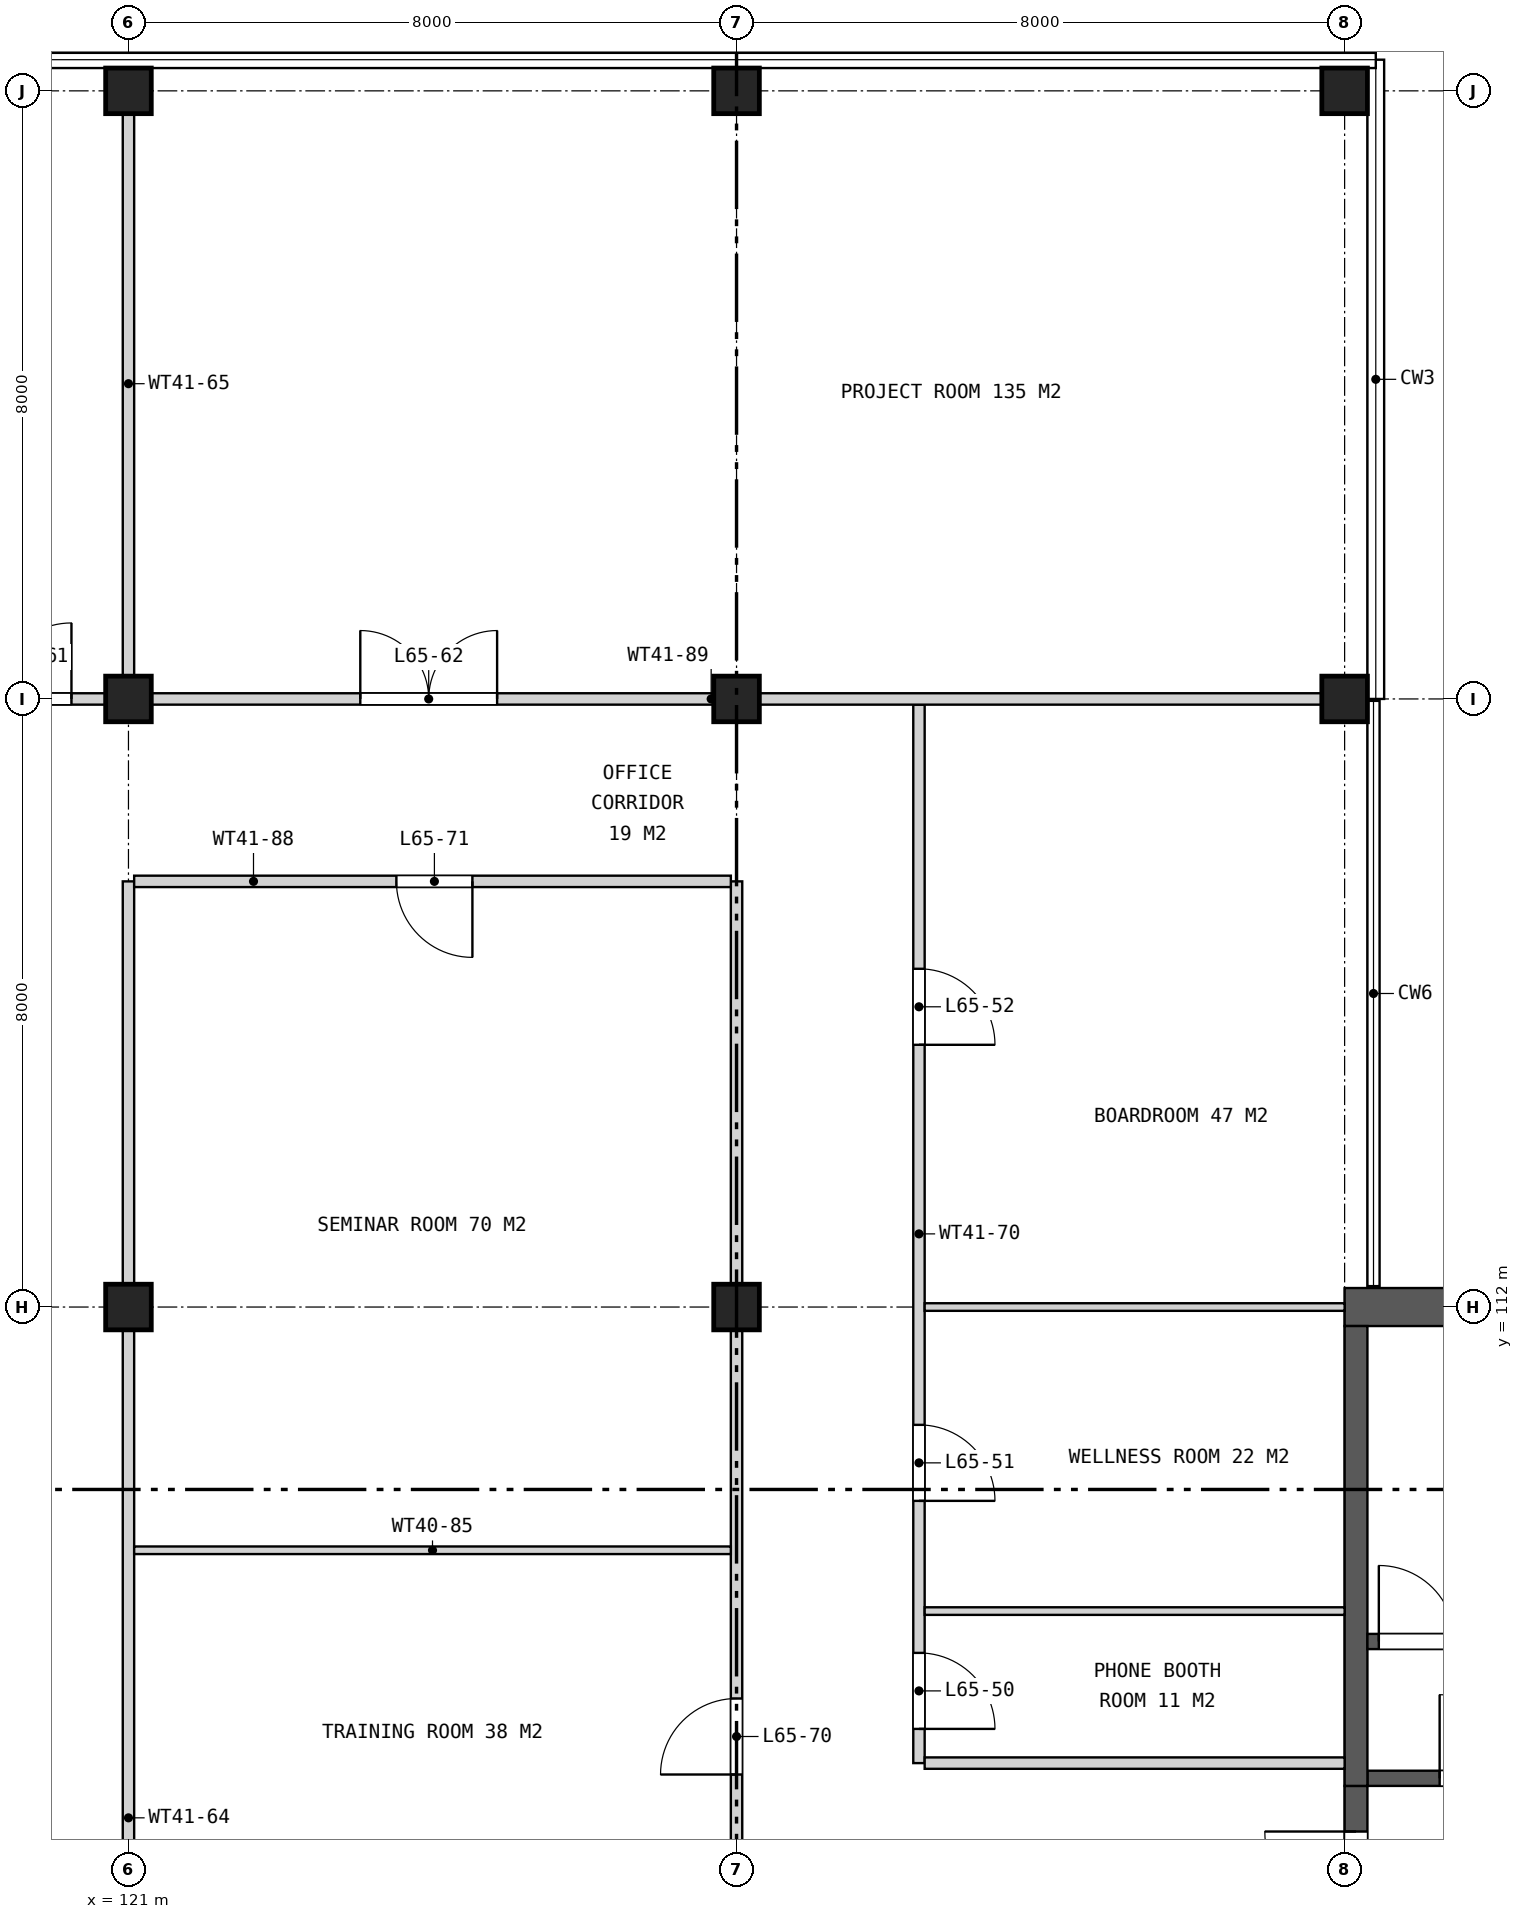
"""IFC4 building model, lengths in metres.
Left out: names, types, materials, properties, quantities, classifications, styles, units other than length and angle.
Written with IfcOpenShell. Run it as: python <this file> out.ifc"""

import sys

from ifc_helpers import new_model, si_unit, direction, frame, frame_2d, origin, origin_2d, place, context, subcontext, project, spatial, rectangle, extrude, element, fill, save


model = new_model("IFC4")
c1 = context("Model", 3, precision=1e-05, world=origin(), true_north=direction((0.0, 1.0)))
c2 = subcontext(c1, "Body", "Model", "MODEL_VIEW")
j1 = project(units=[si_unit("LENGTHUNIT", "METRE"), si_unit("PLANEANGLEUNIT", "RADIAN")], contexts=[c1])
p1 = place(None, origin())
s1 = spatial("IfcSite", under=j1, at=p1, CompositionType="ELEMENT")
p2 = place(p1, origin())
s2 = spatial("IfcBuilding", under=s1, at=p2, CompositionType="ELEMENT")
p3 = place(p2, frame((0.0, 0.0, 299.7)))
s3 = spatial("IfcBuildingStorey", under=s2, at=p3, CompositionType="ELEMENT", Elevation=299.7)
for number, where, z_axis, x_axis in (
    (1, (121.0, 112.0, 0.0), (0.0, 0.0, 1.0), (1.0, 0.0, 0.0)),
    (2, (121.0, 120.0, 0.0), (0.0, 0.0, 1.0), (1.0, 0.0, 0.0)),
    (3, (121.0, 128.0, 0.0), (0.0, 0.0, 1.0), (1.0, 0.0, 0.0)),
    (4, (129.0, 112.0, 0.0), (0.0, 0.0, 1.0), (1.0, 0.0, 0.0)),
    (5, (129.0, 120.0, 0.0), (0.0, 0.0, 1.0), (1.0, 0.0, 0.0)),
    (6, (129.0, 128.0, 0.0), (0.0, 0.0, 1.0), (1.0, 0.0, 0.0)),
    (7, (137.0, 120.0, 0.0), (0.0, 0.0, 1.0), (1.0, 0.0, 0.0)),
    (8, (137.0, 128.0, 0.0), (0.0, 0.0, 1.0), (1.0, 0.0, 0.0)),
):
    element("IfcColumn", number, at=place(p3, frame(where, z_axis=z_axis, x_axis=x_axis)), inside=s3, PredefinedType="COLUMN", context=c2, shape_type="SweptSolid", body=[
        extrude(rectangle(XDim=0.6, YDim=0.6, at=origin_2d()), origin(), (0.0, 0.0, 1.0), 4.2),
    ])
p4 = place(p3, frame((137.0, 112.0, 0.0), z_axis=(0.0, 0.0, 1.0), x_axis=(1.0, 0.0, 0.0)))
e9 = element("IfcWall", 9, at=p4, inside=s3, PredefinedType="SHEAR", context=c2, shape_type="SweptSolid", body=[
    extrude(rectangle(XDim=7.1, YDim=0.5, at=frame_2d((3.55, 0.0))), origin(), (0.0, 0.0, 1.0), 4.2),
])
p5 = place(p3, frame((137.15, 94.3, 0.0), z_axis=(0.0, 0.0, 1.0), x_axis=(0.0, 1.0, 0.0)))
e10 = element("IfcWall", 10, at=p5, inside=s3, PredefinedType="SHEAR", context=c2, shape_type="SweptSolid", body=[
    extrude(rectangle(XDim=11.4, YDim=0.3, at=frame_2d((5.7, 0.0))), origin(), (0.0, 0.0, 1.0), 4.2),
])
p6 = place(p5, frame((0.6, 0.0, 0.0)))
e11 = element("IfcOpeningElement", 11, at=p6, cuts=e10, PredefinedType="OPENING", context=c2, shape_type="SweptSolid", body=[
    extrude(rectangle(XDim=2.4, YDim=2.4, at=frame_2d((1.2, 1.2))), frame((0.0, 0.16, 0.0), z_axis=(0.0, -1.0, 0.0), x_axis=(1.0, 0.0, 0.0)), (0.0, 0.0, 1.0), 0.32),
])
p7 = place(p5, frame((4.5, 0.0, 0.0)))
e12 = element("IfcOpeningElement", 12, at=p7, cuts=e10, PredefinedType="OPENING", context=c2, shape_type="SweptSolid", body=[
    extrude(rectangle(XDim=2.4, YDim=2.4, at=frame_2d((1.2, 1.2))), frame((0.0, 0.16, 0.0), z_axis=(0.0, -1.0, 0.0), x_axis=(1.0, 0.0, 0.0)), (0.0, 0.0, 1.0), 0.32),
])
p8 = place(p5, frame((8.4, 0.0, 0.0)))
e13 = element("IfcOpeningElement", 13, at=p8, cuts=e10, PredefinedType="OPENING", context=c2, shape_type="SweptSolid", body=[
    extrude(rectangle(XDim=2.4, YDim=2.4, at=frame_2d((1.2, 1.2))), frame((0.0, 0.16, 0.0), z_axis=(0.0, -1.0, 0.0), x_axis=(1.0, 0.0, 0.0)), (0.0, 0.0, 1.0), 0.32),
])
p9 = place(p3, frame((137.3, 105.8, 0.0), z_axis=(0.0, 0.0, 1.0), x_axis=(1.0, 0.0, 0.0)))
e14 = element("IfcWall", 14, at=p9, inside=s3, PredefinedType="SHEAR", context=c2, shape_type="SweptSolid", body=[
    extrude(rectangle(XDim=15.45, YDim=0.2, at=frame_2d((7.725, 0.0))), origin(), (0.0, 0.0, 1.0), 4.2),
])
p10 = place(p9, frame((0.95, 0.0, 0.0)))
e15 = element("IfcOpeningElement", 15, at=p10, cuts=e14, PredefinedType="OPENING", context=c2, shape_type="SweptSolid", body=[
    extrude(rectangle(XDim=1.1, YDim=2.1, at=frame_2d((0.55, 1.05))), frame((0.0, 0.11, 0.0), z_axis=(0.0, -1.0, 0.0), x_axis=(1.0, 0.0, 0.0)), (0.0, 0.0, 1.0), 0.22),
])
p11 = place(p3, frame((137.15, 105.7, 0.0), z_axis=(0.0, 0.0, 1.0), x_axis=(0.0, 1.0, 0.0)))
e16 = element("IfcWall", 16, at=p11, inside=s3, PredefinedType="SHEAR", context=c2, shape_type="SweptSolid", body=[
    extrude(rectangle(XDim=6.05, YDim=0.3, at=frame_2d((3.025, 0.0))), origin(), (0.0, 0.0, 1.0), 4.2),
])
p12 = place(p3, frame((137.3, 107.6, 0.0), z_axis=(0.0, 0.0, 1.0), x_axis=(1.0, 0.0, 0.0)))
e17 = element("IfcWall", 17, at=p12, inside=s3, PredefinedType="SHEAR", context=c2, shape_type="SweptSolid", body=[
    extrude(rectangle(XDim=6.8, YDim=0.2, at=frame_2d((3.4, 0.0))), origin(), (0.0, 0.0, 1.0), 4.2),
])
p13 = place(p12, frame((0.15, 0.0, 0.0)))
e18 = element("IfcOpeningElement", 18, at=p13, cuts=e17, PredefinedType="OPENING", context=c2, shape_type="SweptSolid", body=[
    extrude(rectangle(XDim=1.0, YDim=2.1, at=frame_2d((0.5, 1.05))), frame((0.0, 0.11, 0.0), z_axis=(0.0, -1.0, 0.0), x_axis=(1.0, 0.0, 0.0)), (0.0, 0.0, 1.0), 0.22),
])
p14 = place(p3, frame((121.0, 82.4, 0.0), z_axis=(0.0, 0.0, 1.0), x_axis=(0.0, 1.0, 0.0)))
e19 = element("IfcWall", 19, at=p14, inside=s3, PredefinedType="PARTITIONING", context=c2, shape_type="SweptSolid", body=[
    extrude(rectangle(XDim=35.2, YDim=0.15, at=frame_2d((17.6, 0.0))), origin(), (0.0, 0.0, 1.0), 3.255),
])
p15 = place(p14, frame((6.15, 0.0, 0.0)))
e20 = element("IfcOpeningElement", 20, at=p15, cuts=e19, PredefinedType="OPENING", context=c2, shape_type="SweptSolid", body=[
    extrude(rectangle(XDim=1.0, YDim=2.1, at=frame_2d((0.5, 1.05))), frame((0.0, 0.085, 0.0), z_axis=(0.0, -1.0, 0.0), x_axis=(1.0, 0.0, 0.0)), (0.0, 0.0, 1.0), 0.17),
])
p16 = place(p14, frame((10.75, 0.0, 0.0)))
e21 = element("IfcOpeningElement", 21, at=p16, cuts=e19, PredefinedType="OPENING", context=c2, shape_type="SweptSolid", body=[
    extrude(rectangle(XDim=1.0, YDim=2.1, at=frame_2d((0.5, 1.05))), frame((0.0, 0.085, 0.0), z_axis=(0.0, -1.0, 0.0), x_axis=(1.0, 0.0, 0.0)), (0.0, 0.0, 1.0), 0.17),
])
p17 = place(p14, frame((17.45, 0.0, 0.0)))
e22 = element("IfcOpeningElement", 22, at=p17, cuts=e19, PredefinedType="OPENING", context=c2, shape_type="SweptSolid", body=[
    extrude(rectangle(XDim=1.0, YDim=2.1, at=frame_2d((0.5, 1.05))), frame((0.0, 0.085, 0.0), z_axis=(0.0, -1.0, 0.0), x_axis=(1.0, 0.0, 0.0)), (0.0, 0.0, 1.0), 0.17),
])
p18 = place(p3, frame((121.0, 120.075, 0.0), z_axis=(0.0, 0.0, 1.0), x_axis=(0.0, 1.0, 0.0)))
e23 = element("IfcWall", 23, at=p18, inside=s3, PredefinedType="PARTITIONING", context=c2, shape_type="SweptSolid", body=[
    extrude(rectangle(XDim=8.145, YDim=0.15, at=frame_2d((4.073, 0.0))), origin(), (0.0, 0.0, 1.0), 3.255),
])
p19 = place(p3, frame((129.0, 82.4, 0.0), z_axis=(0.0, 0.0, 1.0), x_axis=(0.0, 1.0, 0.0)))
e24 = element("IfcWall", 24, at=p19, inside=s3, PredefinedType="PARTITIONING", context=c2, shape_type="SweptSolid", body=[
    extrude(rectangle(XDim=35.2, YDim=0.15, at=frame_2d((17.6, 0.0))), origin(), (0.0, 0.0, 1.0), 3.255),
])
p20 = place(p19, frame((10.75, 0.0, 0.0)))
e25 = element("IfcOpeningElement", 25, at=p20, cuts=e24, PredefinedType="OPENING", context=c2, shape_type="SweptSolid", body=[
    extrude(rectangle(XDim=1.0, YDim=2.1, at=frame_2d((0.5, 1.05))), frame((0.0, 0.085, 0.0), z_axis=(0.0, -1.0, 0.0), x_axis=(1.0, 0.0, 0.0)), (0.0, 0.0, 1.0), 0.17),
])
p21 = place(p19, frame((17.45, 0.0, 0.0)))
e26 = element("IfcOpeningElement", 26, at=p21, cuts=e24, PredefinedType="OPENING", context=c2, shape_type="SweptSolid", body=[
    extrude(rectangle(XDim=1.0, YDim=2.1, at=frame_2d((0.5, 1.05))), frame((0.0, 0.085, 0.0), z_axis=(0.0, -1.0, 0.0), x_axis=(1.0, 0.0, 0.0)), (0.0, 0.0, 1.0), 0.17),
])
p22 = place(p19, frame((23.45, 0.0, 0.0)))
e27 = element("IfcOpeningElement", 27, at=p22, cuts=e24, PredefinedType="OPENING", context=c2, shape_type="SweptSolid", body=[
    extrude(rectangle(XDim=1.0, YDim=2.1, at=frame_2d((0.5, 1.05))), frame((0.0, 0.085, 0.0), z_axis=(0.0, -1.0, 0.0), x_axis=(1.0, 0.0, 0.0)), (0.0, 0.0, 1.0), 0.17),
])
p23 = place(p3, frame((131.4, 106.0, 0.0), z_axis=(0.0, 0.0, 1.0), x_axis=(0.0, 1.0, 0.0)))
e28 = element("IfcWall", 28, at=p23, inside=s3, PredefinedType="PARTITIONING", context=c2, shape_type="SweptSolid", body=[
    extrude(rectangle(XDim=13.925, YDim=0.15, at=frame_2d((6.962, 0.0))), origin(), (0.0, 0.0, 1.0), 3.255),
])
p24 = place(p23, frame((0.45, 0.0, 0.0)))
e29 = element("IfcOpeningElement", 29, at=p24, cuts=e28, PredefinedType="OPENING", context=c2, shape_type="SweptSolid", body=[
    extrude(rectangle(XDim=1.0, YDim=2.1, at=frame_2d((0.5, 1.05))), frame((0.0, 0.085, 0.0), z_axis=(0.0, -1.0, 0.0), x_axis=(1.0, 0.0, 0.0)), (0.0, 0.0, 1.0), 0.17),
])
p25 = place(p23, frame((3.45, 0.0, 0.0)))
e30 = element("IfcOpeningElement", 30, at=p25, cuts=e28, PredefinedType="OPENING", context=c2, shape_type="SweptSolid", body=[
    extrude(rectangle(XDim=1.0, YDim=2.1, at=frame_2d((0.5, 1.05))), frame((0.0, 0.085, 0.0), z_axis=(0.0, -1.0, 0.0), x_axis=(1.0, 0.0, 0.0)), (0.0, 0.0, 1.0), 0.17),
])
p26 = place(p23, frame((9.45, 0.0, 0.0)))
e31 = element("IfcOpeningElement", 31, at=p26, cuts=e28, PredefinedType="OPENING", context=c2, shape_type="SweptSolid", body=[
    extrude(rectangle(XDim=1.0, YDim=2.1, at=frame_2d((0.5, 1.05))), frame((0.0, 0.085, 0.0), z_axis=(0.0, -1.0, 0.0), x_axis=(1.0, 0.0, 0.0)), (0.0, 0.0, 1.0), 0.17),
])
p27 = place(p3, frame((131.475, 106.0, 0.0), z_axis=(0.0, 0.0, 1.0), x_axis=(1.0, 0.0, 0.0)))
e32 = element("IfcWall", 32, at=p27, inside=s3, PredefinedType="PARTITIONING", context=c2, shape_type="SweptSolid", body=[
    extrude(rectangle(XDim=5.525, YDim=0.15, at=frame_2d((2.762, 0.0))), origin(), (0.0, 0.0, 1.0), 3.255),
])
p28 = place(p3, frame((131.475, 108.0, 0.0), z_axis=(0.0, 0.0, 1.0), x_axis=(1.0, 0.0, 0.0)))
e33 = element("IfcWall", 33, at=p28, inside=s3, PredefinedType="PARTITIONING", context=c2, shape_type="SweptSolid", body=[
    extrude(rectangle(XDim=5.525, YDim=0.1, at=frame_2d((2.762, 0.0))), origin(), (0.0, 0.0, 1.0), 3.255),
])
p29 = place(p3, frame((121.075, 108.8, 0.0), z_axis=(0.0, 0.0, 1.0), x_axis=(1.0, 0.0, 0.0)))
e34 = element("IfcWall", 34, at=p29, inside=s3, PredefinedType="PARTITIONING", context=c2, shape_type="SweptSolid", body=[
    extrude(rectangle(XDim=7.85, YDim=0.1, at=frame_2d((3.925, 0.0))), origin(), (0.0, 0.0, 1.0), 3.255),
])
p30 = place(p3, frame((131.475, 112.0, 0.0), z_axis=(0.0, 0.0, 1.0), x_axis=(1.0, 0.0, 0.0)))
e35 = element("IfcWall", 35, at=p30, inside=s3, PredefinedType="PARTITIONING", context=c2, shape_type="SweptSolid", body=[
    extrude(rectangle(XDim=5.525, YDim=0.1, at=frame_2d((2.762, 0.0))), origin(), (0.0, 0.0, 1.0), 3.255),
])
p31 = place(p3, frame((121.075, 117.6, 0.0), z_axis=(0.0, 0.0, 1.0), x_axis=(1.0, 0.0, 0.0)))
e36 = element("IfcWall", 36, at=p31, inside=s3, PredefinedType="PARTITIONING", context=c2, shape_type="SweptSolid", body=[
    extrude(rectangle(XDim=7.85, YDim=0.15, at=frame_2d((3.925, 0.0))), origin(), (0.0, 0.0, 1.0), 3.255),
])
p32 = place(p31, frame((3.45, 0.0, 0.0)))
e37 = element("IfcOpeningElement", 37, at=p32, cuts=e36, PredefinedType="OPENING", context=c2, shape_type="SweptSolid", body=[
    extrude(rectangle(XDim=1.0, YDim=2.1, at=frame_2d((0.5, 1.05))), frame((0.0, 0.085, 0.0), z_axis=(0.0, -1.0, 0.0), x_axis=(1.0, 0.0, 0.0)), (0.0, 0.0, 1.0), 0.17),
])
p33 = place(p3, frame((112.78, 120.0, 0.0), z_axis=(0.0, 0.0, 1.0), x_axis=(1.0, 0.0, 0.0)))
e38 = element("IfcWall", 38, at=p33, inside=s3, PredefinedType="PARTITIONING", context=c2, shape_type="SweptSolid", body=[
    extrude(rectangle(XDim=24.44, YDim=0.15, at=frame_2d((12.22, 0.0))), origin(), (0.0, 0.0, 1.0), 3.255),
])
p34 = place(p33, frame((6.47, 0.0, 0.0)))
e39 = element("IfcOpeningElement", 39, at=p34, cuts=e38, PredefinedType="OPENING", context=c2, shape_type="SweptSolid", body=[
    extrude(rectangle(XDim=1.0, YDim=2.1, at=frame_2d((0.5, 1.05))), frame((0.0, 0.085, 0.0), z_axis=(0.0, -1.0, 0.0), x_axis=(1.0, 0.0, 0.0)), (0.0, 0.0, 1.0), 0.17),
])
p35 = place(p33, frame((11.27, 0.0, 0.0)))
e40 = element("IfcOpeningElement", 40, at=p35, cuts=e38, PredefinedType="OPENING", context=c2, shape_type="SweptSolid", body=[
    extrude(rectangle(XDim=1.8, YDim=2.1, at=frame_2d((0.9, 1.05))), frame((0.0, 0.085, 0.0), z_axis=(0.0, -1.0, 0.0), x_axis=(1.0, 0.0, 0.0)), (0.0, 0.0, 1.0), 0.17),
])
p36 = place(p8, origin())
e41 = element("IfcDoor", 41, at=p36, inside=s3, OperationType="DOUBLE_DOOR_SINGLE_SWING", PredefinedType="DOOR", context=c2, shape_type="SweptSolid", body=[
    extrude(rectangle(XDim=2.4, YDim=2.4, at=frame_2d((1.2, 1.2))), frame((0.0, 0.025, 0.0), z_axis=(0.0, -1.0, 0.0), x_axis=(1.0, 0.0, 0.0)), (0.0, 0.0, 1.0), 0.05),
])
fill(e13, e41)
p37 = place(p10, origin())
e42 = element("IfcDoor", 42, at=p37, inside=s3, OperationType="SINGLE_SWING_LEFT", PredefinedType="DOOR", context=c2, shape_type="SweptSolid", body=[
    extrude(rectangle(XDim=1.1, YDim=2.1, at=frame_2d((0.55, 1.05))), frame((0.0, 0.025, 0.0), z_axis=(0.0, -1.0, 0.0), x_axis=(1.0, 0.0, 0.0)), (0.0, 0.0, 1.0), 0.05),
])
fill(e15, e42)
p38 = place(p13, origin())
e43 = element("IfcDoor", 43, at=p38, inside=s3, OperationType="SINGLE_SWING_LEFT", PredefinedType="DOOR", context=c2, shape_type="SweptSolid", body=[
    extrude(rectangle(XDim=1.0, YDim=2.1, at=frame_2d((0.5, 1.05))), frame((0.0, 0.025, 0.0), z_axis=(0.0, -1.0, 0.0), x_axis=(1.0, 0.0, 0.0)), (0.0, 0.0, 1.0), 0.05),
])
fill(e18, e43)
p39 = place(p24, frame((1.0, 0.0, 0.0), z_axis=(0.0, 0.0, 1.0), x_axis=(-1.0, 0.0, 0.0)))
e44 = element("IfcDoor", 44, at=p39, inside=s3, OperationType="SINGLE_SWING_RIGHT", PredefinedType="DOOR", context=c2, shape_type="SweptSolid", body=[
    extrude(rectangle(XDim=1.0, YDim=2.1, at=frame_2d((0.5, 1.05))), frame((0.0, 0.025, 0.0), z_axis=(0.0, -1.0, 0.0), x_axis=(1.0, 0.0, 0.0)), (0.0, 0.0, 1.0), 0.05),
])
fill(e29, e44)
p40 = place(p25, frame((1.0, 0.0, 0.0), z_axis=(0.0, 0.0, 1.0), x_axis=(-1.0, 0.0, 0.0)))
e45 = element("IfcDoor", 45, at=p40, inside=s3, OperationType="SINGLE_SWING_RIGHT", PredefinedType="DOOR", context=c2, shape_type="SweptSolid", body=[
    extrude(rectangle(XDim=1.0, YDim=2.1, at=frame_2d((0.5, 1.05))), frame((0.0, 0.025, 0.0), z_axis=(0.0, -1.0, 0.0), x_axis=(1.0, 0.0, 0.0)), (0.0, 0.0, 1.0), 0.05),
])
fill(e30, e45)
p41 = place(p26, frame((1.0, 0.0, 0.0), z_axis=(0.0, 0.0, 1.0), x_axis=(-1.0, 0.0, 0.0)))
e46 = element("IfcDoor", 46, at=p41, inside=s3, OperationType="SINGLE_SWING_RIGHT", PredefinedType="DOOR", context=c2, shape_type="SweptSolid", body=[
    extrude(rectangle(XDim=1.0, YDim=2.1, at=frame_2d((0.5, 1.05))), frame((0.0, 0.025, 0.0), z_axis=(0.0, -1.0, 0.0), x_axis=(1.0, 0.0, 0.0)), (0.0, 0.0, 1.0), 0.05),
])
fill(e31, e46)
p42 = place(p34, origin())
e47 = element("IfcDoor", 47, at=p42, inside=s3, OperationType="SINGLE_SWING_RIGHT", PredefinedType="DOOR", context=c2, shape_type="SweptSolid", body=[
    extrude(rectangle(XDim=1.0, YDim=2.1, at=frame_2d((0.5, 1.05))), frame((0.0, 0.025, 0.0), z_axis=(0.0, -1.0, 0.0), x_axis=(1.0, 0.0, 0.0)), (0.0, 0.0, 1.0), 0.05),
])
fill(e39, e47)
p43 = place(p35, origin())
e48 = element("IfcDoor", 48, at=p43, inside=s3, OperationType="DOUBLE_DOOR_SINGLE_SWING", PredefinedType="DOOR", context=c2, shape_type="SweptSolid", body=[
    extrude(rectangle(XDim=1.8, YDim=2.1, at=frame_2d((0.9, 1.05))), frame((0.0, 0.025, 0.0), z_axis=(0.0, -1.0, 0.0), x_axis=(1.0, 0.0, 0.0)), (0.0, 0.0, 1.0), 0.05),
])
fill(e40, e48)
p44 = place(p22, origin())
e49 = element("IfcDoor", 49, at=p44, inside=s3, OperationType="SINGLE_SWING_LEFT", PredefinedType="DOOR", context=c2, shape_type="SweptSolid", body=[
    extrude(rectangle(XDim=1.0, YDim=2.1, at=frame_2d((0.5, 1.05))), frame((0.0, 0.025, 0.0), z_axis=(0.0, -1.0, 0.0), x_axis=(1.0, 0.0, 0.0)), (0.0, 0.0, 1.0), 0.05),
])
fill(e27, e49)
p45 = place(p32, frame((1.0, 0.0, 0.0), z_axis=(0.0, 0.0, 1.0), x_axis=(-1.0, 0.0, 0.0)))
e50 = element("IfcDoor", 50, at=p45, inside=s3, OperationType="SINGLE_SWING_LEFT", PredefinedType="DOOR", context=c2, shape_type="SweptSolid", body=[
    extrude(rectangle(XDim=1.0, YDim=2.1, at=frame_2d((0.5, 1.05))), frame((0.0, 0.025, 0.0), z_axis=(0.0, -1.0, 0.0), x_axis=(1.0, 0.0, 0.0)), (0.0, 0.0, 1.0), 0.05),
])
fill(e37, e50)
save(model, sys.argv[1])
